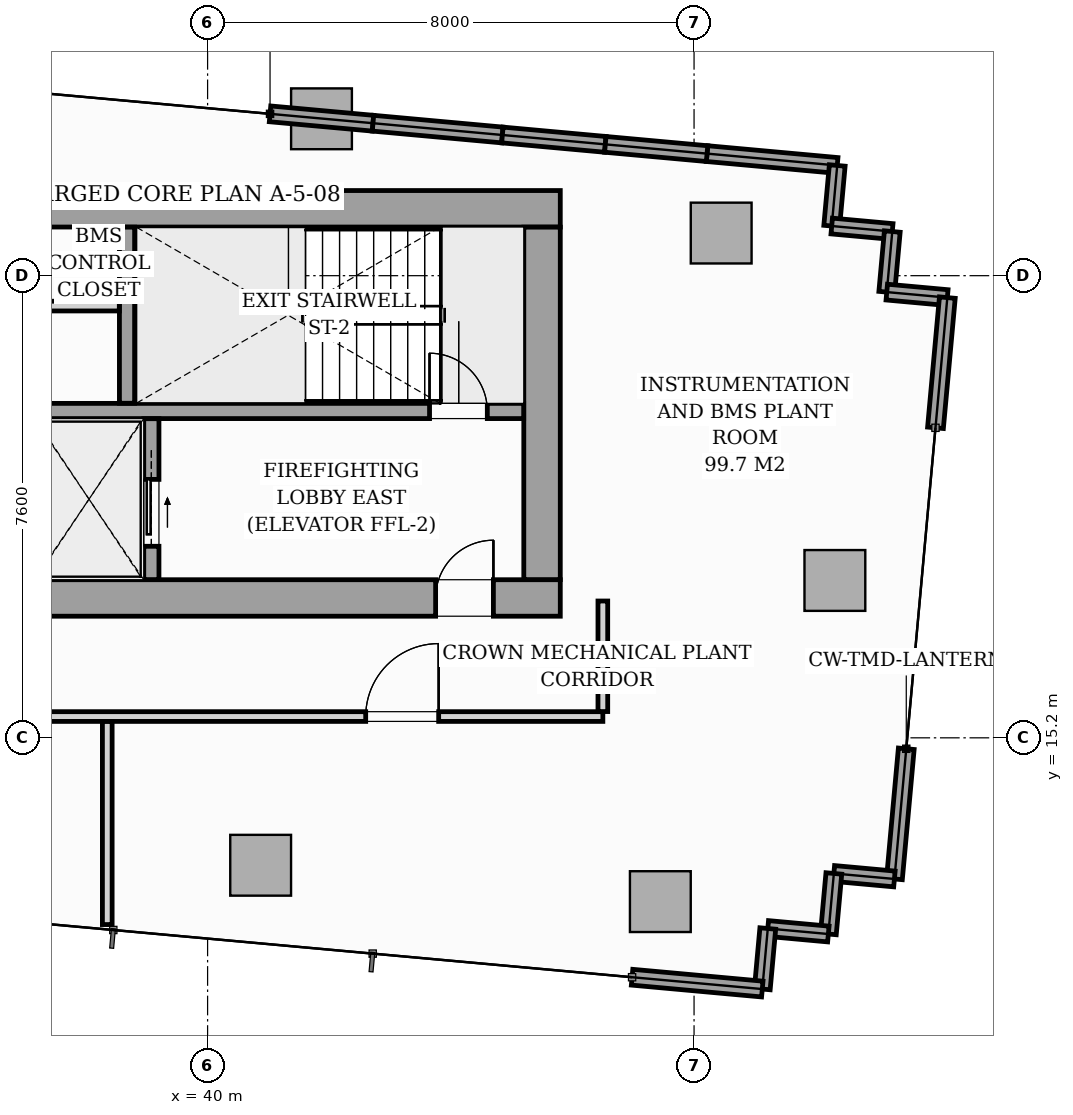
"""IFC4 building model, lengths in metres.
Left out: names, types, materials, properties, quantities, classifications, styles, units other than length and angle.
Written with IfcOpenShell. Run it as: python <this file> out.ifc"""

import sys

from ifc_helpers import new_model, si_unit, direction, frame, frame_2d, origin, origin_2d, place, context, subcontext, project, spatial, rectangle, i_section, extrude, source, transform, mapped, element, fill, save


model = new_model("IFC4")
c1 = context("Model", 3, precision=1e-05, world=origin(), true_north=direction((0.0, 1.0)))
c2 = subcontext(c1, "Body", "Model", "MODEL_VIEW")
j1 = project(units=[si_unit("LENGTHUNIT", "METRE"), si_unit("PLANEANGLEUNIT", "RADIAN")], contexts=[c1])
p1 = place(None, origin())
s1 = spatial("IfcSite", under=j1, at=p1, CompositionType="ELEMENT")
p2 = place(p1, origin())
s2 = spatial("IfcBuilding", under=s1, at=p2, CompositionType="ELEMENT")
p3 = place(p2, frame((0.0, 0.0, 270.8)))
s3 = spatial("IfcBuildingStorey", under=s2, at=p3, CompositionType="ELEMENT", Elevation=270.8)
m1 = source(origin(), c2, "Body", "SweptSolid", [
    extrude(i_section(OverallWidth=0.404, OverallDepth=0.407, WebThickness=0.027, FlangeThickness=0.044, FilletRadius=0.018, at=origin_2d()), origin(), (0.0, 0.0, 1.0), 6.496),
])
for number, where, z_axis, x_axis in (
    (1, (38.88, 17.4, 0.002), (0.0, 0.0, 1.0), (1.0, 0.0, 0.0)),
    (2, (45.6, 17.4, 0.002), (0.0, 0.0, 1.0), (1.0, 0.0, 0.0)),
    (3, (38.88, 24.0, 0.002), (0.0, 0.0, 1.0), (1.0, 0.0, 0.0)),
    (4, (45.6, 24.0, 0.002), (0.0, 0.0, 1.0), (1.0, 0.0, 0.0)),
):
    element("IfcColumn", number, at=place(p3, frame(where, z_axis=z_axis, x_axis=x_axis)), inside=s3, PredefinedType="PILASTER", context=c2, shape_type="MappedRepresentation", body=[
        mapped(m1, transform((0.0, 0.0, 0.0), scale=1.0)),
    ])
m2 = source(origin(), c2, "Body", "SweptSolid", [
    extrude(rectangle(XDim=1.0, YDim=1.0, at=origin_2d()), origin(), (0.0, 0.0, 1.0), 6.496),
])
for number, where, z_axis, x_axis in (
    (5, (40.873, 13.104, 0.002), (0.0, 0.0, 1.0), (0.996, -0.091, 0.0)),
    (6, (47.445, 12.506, 0.002), (0.0, 0.0, 1.0), (0.996, -0.091, 0.0)),
    (7, (41.873, 25.38, 0.002), (0.0, 0.0, 1.0), (0.996, -0.091, 0.0)),
    (8, (48.446, 23.501, 0.002), (0.0, 0.0, 1.0), (0.996, -0.091, 0.0)),
    (9, (50.316, 17.788, 0.002), (0.0, 0.0, 1.0), (0.996, -0.091, 0.0)),
):
    element("IfcColumn", number, at=place(p3, frame(where, z_axis=z_axis, x_axis=x_axis)), inside=s3, PredefinedType="COLUMN", context=c2, shape_type="MappedRepresentation", body=[
        mapped(m2, transform((0.0, 0.0, 0.0), scale=1.0)),
    ])
p4 = place(p3, frame((48.213, 24.807, 0.0), z_axis=(0.0, 0.0, 1.0), x_axis=(0.995885756807, -0.090617654952, 0.0)))
e10 = element("IfcWall", 10, at=p4, inside=s3, PredefinedType="STANDARD", context=c2, shape_type="SweptSolid", body=[
    extrude(rectangle(XDim=2.15, YDim=0.26, at=frame_2d((1.075, 0.0))), origin(), (0.0, 0.0, 1.0), 6.22),
])
p5 = place(p3, frame((41.027, 25.461, 0.0), z_axis=(0.0, 0.0, 1.0), x_axis=(0.995897914147, -0.090483946627, 0.0)))
e11 = element("IfcWall", 11, at=p5, inside=s3, PredefinedType="STANDARD", context=c2, shape_type="SweptSolid", body=[
    extrude(rectangle(XDim=1.7, YDim=0.26, at=frame_2d((0.85, 0.0))), origin(), (0.0, 0.0, 1.0), 6.22),
])
p6 = place(p3, frame((42.72, 25.307, 0.0), z_axis=(0.0, 0.0, 1.0), x_axis=(0.995876331405, -0.090721180259, 0.0)))
e12 = element("IfcWall", 12, at=p6, inside=s3, PredefinedType="STANDARD", context=c2, shape_type="SweptSolid", body=[
    extrude(rectangle(XDim=2.137, YDim=0.26, at=frame_2d((1.068, 0.0))), origin(), (0.0, 0.0, 1.0), 6.22),
])
p7 = place(p3, frame((44.848, 25.114, 0.0), z_axis=(0.0, 0.0, 1.0), x_axis=(0.995884961653, -0.090626393251, 0.0)))
e13 = element("IfcWall", 13, at=p7, inside=s3, PredefinedType="STANDARD", context=c2, shape_type="SweptSolid", body=[
    extrude(rectangle(XDim=1.7, YDim=0.26, at=frame_2d((0.85, 0.0))), origin(), (0.0, 0.0, 1.0), 6.22),
])
p8 = place(p3, frame((46.541, 24.959, 0.0), z_axis=(0.0, 0.0, 1.0), x_axis=(0.995890823101, -0.090561959246, 0.0)))
e14 = element("IfcWall", 14, at=p8, inside=s3, PredefinedType="STANDARD", context=c2, shape_type="SweptSolid", body=[
    extrude(rectangle(XDim=1.679, YDim=0.26, at=frame_2d((0.84, 0.0))), origin(), (0.0, 0.0, 1.0), 6.22),
])
for number, where, z_axis, x_axis in (
    (15, (50.354, 24.613, 0.0), (0.0, 0.0, 1.0), (-0.091, -0.996, 0.0)),
    (16, (50.264, 23.617, 0.0), (0.0, 0.0, 1.0), (0.996, -0.091, 0.0)),
    (17, (51.26, 23.526, 0.0), (0.0, 0.0, 1.0), (-0.091, -0.996, 0.0)),
    (18, (51.169, 22.53, 0.0), (0.0, 0.0, 1.0), (0.996, -0.091, 0.0)),
):
    element("IfcWall", number, at=place(p3, frame(where, z_axis=z_axis, x_axis=x_axis)), inside=s3, PredefinedType="STANDARD", context=c2, shape_type="SweptSolid", body=[
        extrude(rectangle(XDim=1.0, YDim=0.26, at=frame_2d((0.5, 0.0))), origin(), (0.0, 0.0, 1.0), 6.22),
    ])
p9 = place(p3, frame((52.165, 22.439, 0.0), z_axis=(0.0, 0.0, 1.0), x_axis=(-0.090617654952, -0.995885756807, 0.0)))
e19 = element("IfcWall", 19, at=p9, inside=s3, PredefinedType="STANDARD", context=c2, shape_type="SweptSolid", body=[
    extrude(rectangle(XDim=2.15, YDim=0.26, at=frame_2d((1.075, 0.0))), origin(), (0.0, 0.0, 1.0), 6.22),
])
p10 = place(p3, frame((51.49, 15.02, 0.0), z_axis=(0.0, 0.0, 1.0), x_axis=(-0.090720017492, -0.995876437329, 0.0)))
e20 = element("IfcWall", 20, at=p10, inside=s3, PredefinedType="STANDARD", context=c2, shape_type="SweptSolid", body=[
    extrude(rectangle(XDim=2.15, YDim=0.26, at=frame_2d((1.075, 0.0))), origin(), (0.0, 0.0, 1.0), 6.22),
])
for number, where, z_axis, x_axis in (
    (21, (51.295, 12.879, 0.0), (0.0, 0.0, 1.0), (-0.996, 0.091, 0.0)),
    (22, (50.299, 12.969, 0.0), (0.0, 0.0, 1.0), (-0.091, -0.996, 0.0)),
    (23, (50.208, 11.974, 0.0), (0.0, 0.0, 1.0), (-0.996, 0.091, 0.0)),
    (24, (49.213, 12.064, 0.0), (0.0, 0.0, 1.0), (-0.091, -0.996, 0.0)),
):
    element("IfcWall", number, at=place(p3, frame(where, z_axis=z_axis, x_axis=x_axis)), inside=s3, PredefinedType="STANDARD", context=c2, shape_type="SweptSolid", body=[
        extrude(rectangle(XDim=1.0, YDim=0.26, at=frame_2d((0.5, 0.0))), origin(), (0.0, 0.0, 1.0), 6.22),
    ])
p11 = place(p3, frame((49.122, 11.069, 0.0), z_axis=(0.0, 0.0, 1.0), x_axis=(-0.99588668912, 0.090607408268, 0.0)))
e25 = element("IfcWall", 25, at=p11, inside=s3, PredefinedType="STANDARD", context=c2, shape_type="SweptSolid", body=[
    extrude(rectangle(XDim=2.15, YDim=0.26, at=frame_2d((1.075, 0.0))), origin(), (0.0, 0.0, 1.0), 6.22),
])
p12 = place(p3, frame((26.2, 17.5, 0.0), z_axis=(0.0, 0.0, 1.0), x_axis=(1.0, 0.0, 0.0)))
e26 = element("IfcWall", 26, at=p12, inside=s3, PredefinedType="SHEAR", context=c2, shape_type="SweptSolid", body=[
    extrude(rectangle(XDim=19.6, YDim=0.6, at=frame_2d((9.8, 0.0))), origin(), (0.0, 0.0, 1.0), 6.5),
])
p13 = place(p12, frame((0.95, 0.0, 0.0)))
e27 = element("IfcOpeningElement", 27, at=p13, cuts=e26, PredefinedType="OPENING", context=c2, shape_type="SweptSolid", body=[
    extrude(rectangle(XDim=0.95, YDim=2.06, at=frame_2d((0.475, 1.03))), frame((0.0, 0.31, 0.0), z_axis=(0.0, -1.0, 0.0), x_axis=(1.0, 0.0, 0.0)), (0.0, 0.0, 1.0), 0.62),
])
p14 = place(p12, frame((9.38, 0.0, 0.0)))
e28 = element("IfcOpeningElement", 28, at=p14, cuts=e26, PredefinedType="OPENING", context=c2, shape_type="SweptSolid", body=[
    extrude(rectangle(XDim=0.9, YDim=2.06, at=frame_2d((0.45, 1.03))), frame((0.0, 0.31, 0.0), z_axis=(0.0, -1.0, 0.0), x_axis=(1.0, 0.0, 0.0)), (0.0, 0.0, 1.0), 0.62),
])
p15 = place(p12, frame((17.55, 0.0, 0.0)))
e29 = element("IfcOpeningElement", 29, at=p15, cuts=e26, PredefinedType="OPENING", context=c2, shape_type="SweptSolid", body=[
    extrude(rectangle(XDim=0.95, YDim=2.06, at=frame_2d((0.475, 1.03))), frame((0.0, 0.31, 0.0), z_axis=(0.0, -1.0, 0.0), x_axis=(1.0, 0.0, 0.0)), (0.0, 0.0, 1.0), 0.62),
])
p16 = place(p3, frame((26.2, 23.9, 0.0), z_axis=(0.0, 0.0, 1.0), x_axis=(1.0, 0.0, 0.0)))
e30 = element("IfcWall", 30, at=p16, inside=s3, PredefinedType="SHEAR", context=c2, shape_type="SweptSolid", body=[
    extrude(rectangle(XDim=19.6, YDim=0.6, at=frame_2d((9.8, 0.0))), origin(), (0.0, 0.0, 1.0), 6.5),
])
p17 = place(p3, frame((45.5, 17.802, 0.0), z_axis=(0.0, 0.0, 1.0), x_axis=(0.0, 1.0, 0.0)))
e31 = element("IfcWall", 31, at=p17, inside=s3, PredefinedType="SHEAR", context=c2, shape_type="SweptSolid", body=[
    extrude(rectangle(XDim=5.796, YDim=0.6, at=frame_2d((2.898, 0.0))), origin(), (0.0, 0.0, 1.0), 6.5),
])
p18 = place(p3, frame((37.05, 20.575, 0.0), z_axis=(0.0, 0.0, 1.0), x_axis=(1.0, 0.0, 0.0)))
e32 = element("IfcWall", 32, at=p18, inside=s3, PredefinedType="SOLIDWALL", context=c2, shape_type="SweptSolid", body=[
    extrude(rectangle(XDim=8.148, YDim=0.25, at=frame_2d((4.074, 0.0))), origin(), (0.0, 0.0, 1.0), 6.5),
])
p19 = place(p18, frame((6.6, 0.0, 0.0)))
e33 = element("IfcOpeningElement", 33, at=p19, cuts=e32, PredefinedType="OPENING", context=c2, shape_type="SweptSolid", body=[
    extrude(rectangle(XDim=0.95, YDim=2.06, at=frame_2d((0.475, 1.03))), frame((0.0, 0.135, 0.0), z_axis=(0.0, -1.0, 0.0), x_axis=(1.0, 0.0, 0.0)), (0.0, 0.0, 1.0), 0.27),
])
p20 = place(p3, frame((38.675, 20.702, 0.0), z_axis=(0.0, 0.0, 1.0), x_axis=(0.0, 1.0, 0.0)))
e34 = element("IfcWall", 34, at=p20, inside=s3, PredefinedType="SOLIDWALL", context=c2, shape_type="SweptSolid", body=[
    extrude(rectangle(XDim=2.896, YDim=0.25, at=frame_2d((1.448, 0.0))), origin(), (0.0, 0.0, 1.0), 6.5),
])
p21 = place(p3, frame((39.075, 17.802, 0.0), z_axis=(0.0, 0.0, 1.0), x_axis=(0.0, 1.0, 0.0)))
e35 = element("IfcWall", 35, at=p21, inside=s3, PredefinedType="SOLIDWALL", context=c2, shape_type="SweptSolid", body=[
    extrude(rectangle(XDim=2.646, YDim=0.25, at=frame_2d((1.323, 0.0))), origin(), (0.0, 0.0, 1.0), 6.5),
])
p22 = place(p21, frame((0.548, 0.0, 0.0)))
e36 = element("IfcOpeningElement", 36, at=p22, cuts=e35, PredefinedType="OPENING", context=c2, shape_type="SweptSolid", body=[
    extrude(rectangle(XDim=1.1, YDim=2.08, at=frame_2d((0.55, 1.04))), frame((0.0, 0.135, 0.0), z_axis=(0.0, -1.0, 0.0), x_axis=(1.0, 0.0, 0.0)), (0.0, 0.0, 1.0), 0.27),
])
p23 = place(p3, frame((34.982, 22.3, 0.0), z_axis=(0.0, 0.0, 1.0), x_axis=(1.0, 0.0, 0.0)))
e37 = element("IfcWall", 37, at=p23, inside=s3, PredefinedType="PARTITIONING", context=c2, shape_type="SweptSolid", body=[
    extrude(rectangle(XDim=3.566, YDim=0.16, at=frame_2d((1.783, 0.0))), origin(), (0.0, 0.0, 1.0), 6.22),
])
p24 = place(p23, frame((1.378, 0.0, 0.0)))
e38 = element("IfcOpeningElement", 38, at=p24, cuts=e37, PredefinedType="OPENING", context=c2, shape_type="SweptSolid", body=[
    extrude(rectangle(XDim=0.8, YDim=2.05, at=frame_2d((0.4, 1.025))), frame((0.0, 0.09, 0.0), z_axis=(0.0, -1.0, 0.0), x_axis=(1.0, 0.0, 0.0)), (0.0, 0.0, 1.0), 0.18),
])
p25 = place(p3, frame((25.5, 15.55, 0.0), z_axis=(0.0, 0.0, 1.0), x_axis=(1.0, 0.0, 0.0)))
e39 = element("IfcWall", 39, at=p25, inside=s3, PredefinedType="PARTITIONING", context=c2, shape_type="SweptSolid", body=[
    extrude(rectangle(XDim=21.0, YDim=0.16, at=frame_2d((10.5, 0.0))), origin(), (0.0, 0.0, 1.0), 5.785),
])
p26 = place(p25, frame((3.12, 0.0, 0.0)))
e40 = element("IfcOpeningElement", 40, at=p26, cuts=e39, PredefinedType="OPENING", context=c2, shape_type="SweptSolid", body=[
    extrude(rectangle(XDim=0.55, YDim=2.02, at=frame_2d((0.275, 1.01))), frame((0.0, 0.09, 0.0), z_axis=(0.0, -1.0, 0.0), x_axis=(1.0, 0.0, 0.0)), (0.0, 0.0, 1.0), 0.18),
])
p27 = place(p25, frame((5.45, 0.0, 0.0)))
e41 = element("IfcOpeningElement", 41, at=p27, cuts=e39, PredefinedType="OPENING", context=c2, shape_type="SweptSolid", body=[
    extrude(rectangle(XDim=1.2, YDim=2.08, at=frame_2d((0.6, 1.04))), frame((0.0, 0.09, 0.0), z_axis=(0.0, -1.0, 0.0), x_axis=(1.0, 0.0, 0.0)), (0.0, 0.0, 1.0), 0.18),
])
p28 = place(p25, frame((17.1, 0.0, 0.0)))
e42 = element("IfcOpeningElement", 42, at=p28, cuts=e39, PredefinedType="OPENING", context=c2, shape_type="SweptSolid", body=[
    extrude(rectangle(XDim=1.2, YDim=2.08, at=frame_2d((0.6, 1.04))), frame((0.0, 0.09, 0.0), z_axis=(0.0, -1.0, 0.0), x_axis=(1.0, 0.0, 0.0)), (0.0, 0.0, 1.0), 0.18),
])
p29 = place(p3, frame((46.5, 15.632, 0.0), z_axis=(0.0, 0.0, 1.0), x_axis=(0.0, 1.0, 0.0)))
e43 = element("IfcWall", 43, at=p29, inside=s3, PredefinedType="PARTITIONING", context=c2, shape_type="SweptSolid", body=[
    extrude(rectangle(XDim=1.818, YDim=0.16, at=frame_2d((0.909, 0.0))), origin(), (0.0, 0.0, 1.0), 6.22),
])
p30 = place(p3, frame((38.35, 12.129, 0.0), z_axis=(0.0, 0.0, 1.0), x_axis=(0.0, 1.0, 0.0)))
e44 = element("IfcWall", 44, at=p30, inside=s3, PredefinedType="PARTITIONING", context=c2, shape_type="SweptSolid", body=[
    extrude(rectangle(XDim=3.339, YDim=0.16, at=frame_2d((1.669, 0.0))), origin(), (0.0, 0.0, 1.0), 6.22),
])
m3 = source(origin(), c2, "Body", "SweptSolid", [
    extrude(rectangle(XDim=0.95, YDim=2.06, at=frame_2d((0.475, 1.03))), frame((0.0, 0.025, 0.0), z_axis=(0.0, -1.0, 0.0), x_axis=(1.0, 0.0, 0.0)), (0.0, 0.0, 1.0), 0.05),
])
p31 = place(p15, origin())
e45 = element("IfcDoor", 45, at=p31, inside=s3, OperationType="SINGLE_SWING_RIGHT", PredefinedType="DOOR", context=c2, shape_type="MappedRepresentation", body=[
    mapped(m3, transform((0.0, 0.0, 0.0), scale=1.0)),
])
fill(e29, e45)
p32 = place(p19, origin())
e46 = element("IfcDoor", 46, at=p32, inside=s3, OperationType="SINGLE_SWING_LEFT", PredefinedType="DOOR", context=c2, shape_type="MappedRepresentation", body=[
    mapped(m3, transform((0.0, 0.0, 0.0), scale=1.0)),
])
fill(e33, e46)
m4 = source(origin(), c2, "Body", "SweptSolid", [
    extrude(rectangle(XDim=1.1, YDim=2.08, at=frame_2d((0.55, 1.04))), frame((0.0, 0.025, 0.0), z_axis=(0.0, -1.0, 0.0), x_axis=(1.0, 0.0, 0.0)), (0.0, 0.0, 1.0), 0.05),
])
p33 = place(p22, origin())
e47 = element("IfcDoor", 47, at=p33, inside=s3, OperationType="SLIDING_TO_RIGHT", PredefinedType="DOOR", context=c2, shape_type="MappedRepresentation", body=[
    mapped(m4, transform((0.0, 0.0, 0.0), scale=1.0)),
])
fill(e36, e47)
m5 = source(origin(), c2, "Body", "SweptSolid", [
    extrude(rectangle(XDim=1.2, YDim=2.08, at=frame_2d((0.6, 1.04))), frame((0.0, 0.025, 0.0), z_axis=(0.0, -1.0, 0.0), x_axis=(1.0, 0.0, 0.0)), (0.0, 0.0, 1.0), 0.05),
])
p34 = place(p28, origin())
e48 = element("IfcDoor", 48, at=p34, inside=s3, OperationType="SINGLE_SWING_RIGHT", PredefinedType="DOOR", context=c2, shape_type="MappedRepresentation", body=[
    mapped(m5, transform((0.0, 0.0, 0.0), scale=1.0)),
])
fill(e42, e48)
save(model, sys.argv[1])
